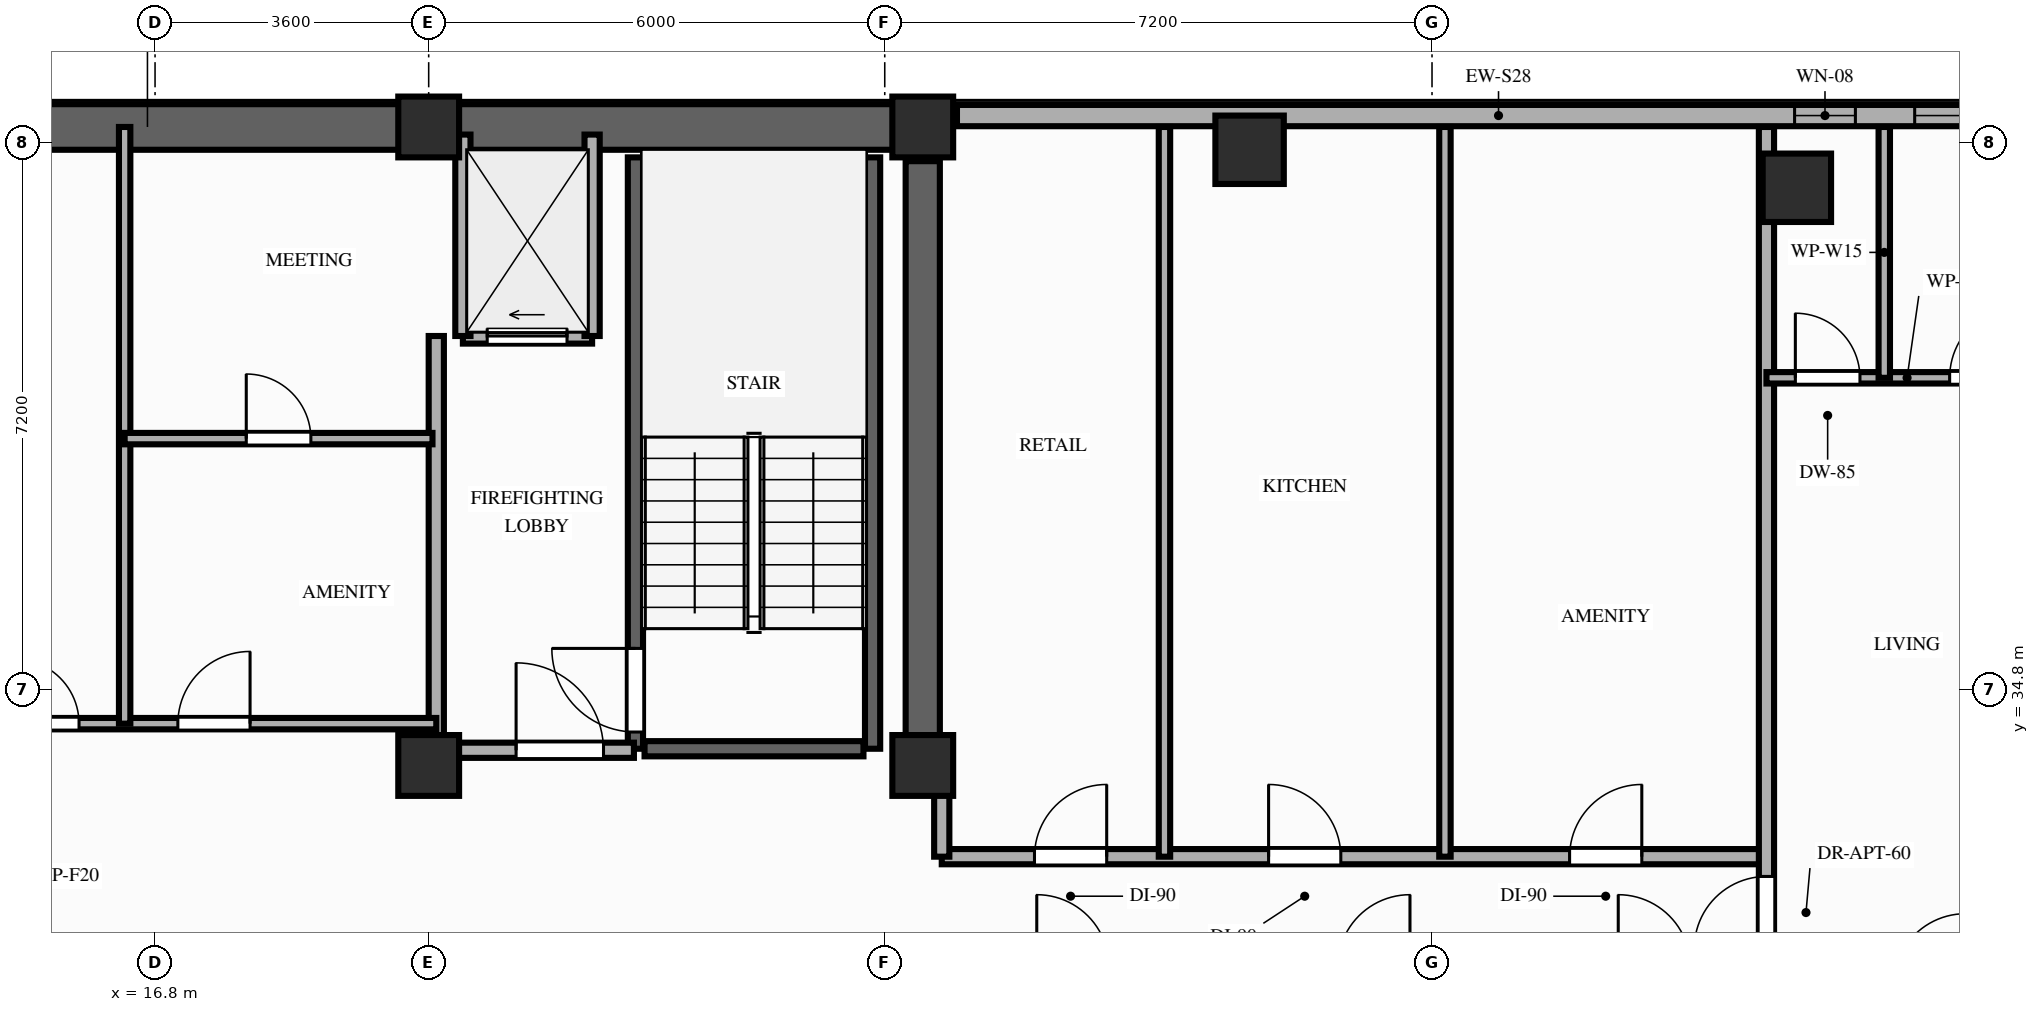
"""IFC4 building model, lengths in metres.
Left out: names, types, materials, properties, quantities, classifications, styles, units other than length and angle.
Written with IfcOpenShell. Run it as: python <this file> out.ifc"""

import sys

from ifc_helpers import new_model, si_unit, direction, frame, frame_2d, origin, origin_2d, place, context, subcontext, project, spatial, rectangle, extrude, element, fill, save


model = new_model("IFC4")
c1 = context("Model", 3, precision=1e-05, world=origin(), true_north=direction((0.0, 1.0)))
c2 = subcontext(c1, "Body", "Model", "MODEL_VIEW")
j1 = project(units=[si_unit("LENGTHUNIT", "METRE"), si_unit("PLANEANGLEUNIT", "RADIAN")], contexts=[c1])
p1 = place(None, origin())
s1 = spatial("IfcSite", under=j1, at=p1, CompositionType="ELEMENT")
p2 = place(p1, origin())
s2 = spatial("IfcBuilding", under=s1, at=p2, CompositionType="ELEMENT")
p3 = place(p2, frame((0.0, 0.0, 192.0)))
s3 = spatial("IfcBuildingStorey", under=s2, at=p3, CompositionType="ELEMENT", Elevation=192.0)
for number, where, z_axis, x_axis in (
    (1, (20.4, 33.8, 0.0), (0.0, 0.0, 1.0), (1.0, 0.0, 0.0)),
    (2, (26.9, 33.8, 0.0), (0.0, 0.0, 1.0), (1.0, 0.0, 0.0)),
    (3, (20.4, 42.2, 0.0), (0.0, 0.0, 1.0), (1.0, 0.0, 0.0)),
    (4, (26.9, 42.2, 0.0), (0.0, 0.0, 1.0), (1.0, 0.0, 0.0)),
):
    element("IfcColumn", number, at=place(p3, frame(where, z_axis=z_axis, x_axis=x_axis)), inside=s3, PredefinedType="COLUMN", context=c2, shape_type="SweptSolid", body=[
        extrude(rectangle(XDim=0.8, YDim=0.8, at=origin_2d()), origin(), (0.0, 0.0, 1.0), 3.2),
    ])
for number, where, z_axis, x_axis in (
    (5, (31.2, 41.9, 0.0), (0.0, 0.0, 1.0), (1.0, 0.0, 0.0)),
    (6, (38.4, 41.4, 0.0), (0.0, 0.0, 1.0), (1.0, 0.0, 0.0)),
):
    element("IfcColumn", number, at=place(p3, frame(where, z_axis=z_axis, x_axis=x_axis)), inside=s3, PredefinedType="COLUMN", context=c2, shape_type="SweptSolid", body=[
        extrude(rectangle(XDim=0.9, YDim=0.9, at=origin_2d()), origin(), (0.0, 0.0, 1.0), 3.2),
    ])
p4 = place(p3, frame((41.6, 42.35, 0.0), z_axis=(0.0, 0.0, 1.0), x_axis=(-1.0, 0.0, 0.0)))
e7 = element("IfcWall", 7, at=p4, inside=s3, PredefinedType="STANDARD", context=c2, shape_type="SweptSolid", body=[
    extrude(rectangle(XDim=14.25, YDim=0.28, at=frame_2d((7.125, 0.0))), origin(), (0.0, 0.0, 1.0), 2.51),
])
p5 = place(p4, frame((2.43, 0.0, 0.85)))
e8 = element("IfcOpeningElement", 8, at=p5, cuts=e7, PredefinedType="OPENING", context=c2, shape_type="SweptSolid", body=[
    extrude(rectangle(XDim=0.8, YDim=1.41, at=frame_2d((0.4, 0.705))), frame((0.0, 0.15, 0.0), z_axis=(0.0, -1.0, 0.0), x_axis=(1.0, 0.0, 0.0)), (0.0, 0.0, 1.0), 0.3),
])
p6 = place(p4, frame((0.55, 0.0, 0.85)))
e9 = element("IfcOpeningElement", 9, at=p6, cuts=e7, PredefinedType="OPENING", context=c2, shape_type="SweptSolid", body=[
    extrude(rectangle(XDim=1.1, YDim=1.41, at=frame_2d((0.55, 0.705))), frame((0.0, 0.15, 0.0), z_axis=(0.0, -1.0, 0.0), x_axis=(1.0, 0.0, 0.0)), (0.0, 0.0, 1.0), 0.3),
])
p7 = place(p3, frame((6.45, 42.2, 0.0), z_axis=(0.0, 0.0, 1.0), x_axis=(1.0, 0.0, 0.0)))
e10 = element("IfcWall", 10, at=p7, inside=s3, PredefinedType="SHEAR", context=c2, shape_type="SweptSolid", body=[
    extrude(rectangle(XDim=20.45, YDim=0.6, at=frame_2d((10.225, 0.0))), origin(), (0.0, 0.0, 1.0), 3.02),
])
p8 = place(p3, frame((26.9, 33.8, 0.0), z_axis=(0.0, 0.0, 1.0), x_axis=(0.0, 1.0, 0.0)))
e11 = element("IfcWall", 11, at=p8, inside=s3, PredefinedType="SHEAR", context=c2, shape_type="SweptSolid", body=[
    extrude(rectangle(XDim=7.95, YDim=0.45, at=frame_2d((3.975, 0.0))), origin(), (0.0, 0.0, 1.0), 3.02),
])
p9 = place(p3, frame((23.12, 34.02, 0.0), z_axis=(0.0, 0.0, 1.0), x_axis=(0.0, 1.0, 0.0)))
e12 = element("IfcWall", 12, at=p9, inside=s3, PredefinedType="SHEAR", context=c2, shape_type="SweptSolid", body=[
    extrude(rectangle(XDim=7.78, YDim=0.2, at=frame_2d((3.89, 0.0))), origin(), (0.0, 0.0, 1.0), 3.02),
])
p10 = place(p9, frame((0.22, 0.0, 0.0)))
e13 = element("IfcOpeningElement", 13, at=p10, cuts=e12, PredefinedType="OPENING", context=c2, shape_type="SweptSolid", body=[
    extrude(rectangle(XDim=1.1, YDim=2.15, at=frame_2d((0.55, 1.075))), frame((0.0, 0.11, 0.0), z_axis=(0.0, -1.0, 0.0), x_axis=(1.0, 0.0, 0.0)), (0.0, 0.0, 1.0), 0.22),
])
p11 = place(p3, frame((26.24, 34.02, 0.0), z_axis=(0.0, 0.0, 1.0), x_axis=(0.0, 1.0, 0.0)))
e14 = element("IfcWall", 14, at=p11, inside=s3, PredefinedType="SHEAR", context=c2, shape_type="SweptSolid", body=[
    extrude(rectangle(XDim=7.78, YDim=0.2, at=frame_2d((3.89, 0.0))), origin(), (0.0, 0.0, 1.0), 3.02),
])
p12 = place(p3, frame((23.24, 34.02, 0.0), z_axis=(0.0, 0.0, 1.0), x_axis=(1.0, 0.0, 0.0)))
e15 = element("IfcWall", 15, at=p12, inside=s3, PredefinedType="SHEAR", context=c2, shape_type="SweptSolid", body=[
    extrude(rectangle(XDim=2.88, YDim=0.2, at=frame_2d((1.44, 0.0))), origin(), (0.0, 0.0, 1.0), 3.02),
])
p13 = place(p3, frame((20.85, 39.45, 0.0), z_axis=(0.0, 0.0, 1.0), x_axis=(1.0, 0.0, 0.0)))
e16 = element("IfcWall", 16, at=p13, inside=s3, PredefinedType="MOVABLE", context=c2, shape_type="SweptSolid", body=[
    extrude(rectangle(XDim=1.7, YDim=0.2, at=frame_2d((0.85, 0.0))), origin(), (0.0, 0.0, 1.0), 3.02),
])
p14 = place(p13, frame((0.32, 0.0, 0.0)))
e17 = element("IfcOpeningElement", 17, at=p14, cuts=e16, PredefinedType="OPENING", context=c2, shape_type="SweptSolid", body=[
    extrude(rectangle(XDim=1.05, YDim=2.15, at=frame_2d((0.525, 1.075))), frame((0.0, 0.11, 0.0), z_axis=(0.0, -1.0, 0.0), x_axis=(1.0, 0.0, 0.0)), (0.0, 0.0, 1.0), 0.22),
])
for number, where, z_axis, x_axis in (
    (18, (20.85, 39.45, 0.0), (0.0, 0.0, 1.0), (0.0, 1.0, 0.0)),
    (19, (22.55, 39.45, 0.0), (0.0, 0.0, 1.0), (0.0, 1.0, 0.0)),
):
    element("IfcWall", number, at=place(p3, frame(where, z_axis=z_axis, x_axis=x_axis)), inside=s3, PredefinedType="MOVABLE", context=c2, shape_type="SweptSolid", body=[
        extrude(rectangle(XDim=2.65, YDim=0.2, at=frame_2d((1.325, 0.0))), origin(), (0.0, 0.0, 1.0), 2.51),
    ])
p15 = place(p3, frame((20.5, 34.0, 0.0), z_axis=(0.0, 0.0, 1.0), x_axis=(0.0, 1.0, 0.0)))
e20 = element("IfcWall", 20, at=p15, inside=s3, PredefinedType="PARTITIONING", context=c2, shape_type="SweptSolid", body=[
    extrude(rectangle(XDim=5.45, YDim=0.2, at=frame_2d((2.725, 0.0))), origin(), (0.0, 0.0, 1.0), 2.51),
])
p16 = place(p3, frame((20.5, 34.0, 0.0), z_axis=(0.0, 0.0, 1.0), x_axis=(1.0, 0.0, 0.0)))
e21 = element("IfcWall", 21, at=p16, inside=s3, PredefinedType="PARTITIONING", context=c2, shape_type="SweptSolid", body=[
    extrude(rectangle(XDim=2.6, YDim=0.2, at=frame_2d((1.3, 0.0))), origin(), (0.0, 0.0, 1.0), 2.51),
])
p17 = place(p16, frame((1.05, 0.0, 0.0)))
e22 = element("IfcOpeningElement", 22, at=p17, cuts=e21, PredefinedType="OPENING", context=c2, shape_type="SweptSolid", body=[
    extrude(rectangle(XDim=1.15, YDim=2.15, at=frame_2d((0.575, 1.075))), frame((0.0, 0.11, 0.0), z_axis=(0.0, -1.0, 0.0), x_axis=(1.0, 0.0, 0.0)), (0.0, 0.0, 1.0), 0.22),
])
p18 = place(p3, frame((12.9, 34.35, 0.0), z_axis=(0.0, 0.0, 1.0), x_axis=(1.0, 0.0, 0.0)))
e23 = element("IfcWall", 23, at=p18, inside=s3, PredefinedType="PARTITIONING", context=c2, shape_type="SweptSolid", body=[
    extrude(rectangle(XDim=7.6, YDim=0.15, at=frame_2d((3.8, 0.0))), origin(), (0.0, 0.0, 1.0), 3.02),
])
p19 = place(p18, frame((2.05, 0.0, 0.0)))
e24 = element("IfcOpeningElement", 24, at=p19, cuts=e23, PredefinedType="OPENING", context=c2, shape_type="SweptSolid", body=[
    extrude(rectangle(XDim=0.85, YDim=2.05, at=frame_2d((0.425, 1.025))), frame((0.0, 0.085, 0.0), z_axis=(0.0, -1.0, 0.0), x_axis=(1.0, 0.0, 0.0)), (0.0, 0.0, 1.0), 0.17),
])
p20 = place(p18, frame((4.2, 0.0, 0.0)))
e25 = element("IfcOpeningElement", 25, at=p20, cuts=e23, PredefinedType="OPENING", context=c2, shape_type="SweptSolid", body=[
    extrude(rectangle(XDim=0.95, YDim=2.15, at=frame_2d((0.475, 1.075))), frame((0.0, 0.085, 0.0), z_axis=(0.0, -1.0, 0.0), x_axis=(1.0, 0.0, 0.0)), (0.0, 0.0, 1.0), 0.17),
])
p21 = place(p3, frame((16.4, 34.35, 0.0), z_axis=(0.0, 0.0, 1.0), x_axis=(0.0, 1.0, 0.0)))
e26 = element("IfcWall", 26, at=p21, inside=s3, PredefinedType="PARTITIONING", context=c2, shape_type="SweptSolid", body=[
    extrude(rectangle(XDim=7.85, YDim=0.15, at=frame_2d((3.925, 0.0))), origin(), (0.0, 0.0, 1.0), 2.51),
])
p22 = place(p3, frame((16.4, 38.1, 0.0), z_axis=(0.0, 0.0, 1.0), x_axis=(1.0, 0.0, 0.0)))
e27 = element("IfcWall", 27, at=p22, inside=s3, PredefinedType="PARTITIONING", context=c2, shape_type="SweptSolid", body=[
    extrude(rectangle(XDim=4.05, YDim=0.15, at=frame_2d((2.025, 0.0))), origin(), (0.0, 0.0, 1.0), 3.02),
])
p23 = place(p22, frame((1.6, 0.0, 0.0)))
e28 = element("IfcOpeningElement", 28, at=p23, cuts=e27, PredefinedType="OPENING", context=c2, shape_type="SweptSolid", body=[
    extrude(rectangle(XDim=0.85, YDim=2.05, at=frame_2d((0.425, 1.025))), frame((0.0, 0.085, 0.0), z_axis=(0.0, -1.0, 0.0), x_axis=(1.0, 0.0, 0.0)), (0.0, 0.0, 1.0), 0.17),
])
p24 = place(p3, frame((27.15, 32.6, 0.0), z_axis=(0.0, 0.0, 1.0), x_axis=(1.0, 0.0, 0.0)))
e29 = element("IfcWall", 29, at=p24, inside=s3, PredefinedType="PARTITIONING", context=c2, shape_type="SweptSolid", body=[
    extrude(rectangle(XDim=10.85, YDim=0.2, at=frame_2d((5.425, 0.0))), origin(), (0.0, 0.0, 1.0), 2.51),
])
p25 = place(p24, frame((1.22, 0.0, 0.0)))
e30 = element("IfcOpeningElement", 30, at=p25, cuts=e29, PredefinedType="OPENING", context=c2, shape_type="SweptSolid", body=[
    extrude(rectangle(XDim=0.95, YDim=2.15, at=frame_2d((0.475, 1.075))), frame((0.0, 0.11, 0.0), z_axis=(0.0, -1.0, 0.0), x_axis=(1.0, 0.0, 0.0)), (0.0, 0.0, 1.0), 0.22),
])
p26 = place(p24, frame((4.3, 0.0, 0.0)))
e31 = element("IfcOpeningElement", 31, at=p26, cuts=e29, PredefinedType="OPENING", context=c2, shape_type="SweptSolid", body=[
    extrude(rectangle(XDim=0.95, YDim=2.15, at=frame_2d((0.475, 1.075))), frame((0.0, 0.11, 0.0), z_axis=(0.0, -1.0, 0.0), x_axis=(1.0, 0.0, 0.0)), (0.0, 0.0, 1.0), 0.22),
])
p27 = place(p24, frame((8.26, 0.0, 0.0)))
e32 = element("IfcOpeningElement", 32, at=p27, cuts=e29, PredefinedType="OPENING", context=c2, shape_type="SweptSolid", body=[
    extrude(rectangle(XDim=0.95, YDim=2.15, at=frame_2d((0.475, 1.075))), frame((0.0, 0.11, 0.0), z_axis=(0.0, -1.0, 0.0), x_axis=(1.0, 0.0, 0.0)), (0.0, 0.0, 1.0), 0.22),
])
p28 = place(p3, frame((27.15, 32.6, 0.0), z_axis=(0.0, 0.0, 1.0), x_axis=(0.0, 1.0, 0.0)))
e33 = element("IfcWall", 33, at=p28, inside=s3, PredefinedType="PARTITIONING", context=c2, shape_type="SweptSolid", body=[
    extrude(rectangle(XDim=1.08, YDim=0.2, at=frame_2d((0.54, 0.0))), origin(), (0.0, 0.0, 1.0), 2.51),
])
p29 = place(p3, frame((38.0, 26.75, 0.0), z_axis=(0.0, 0.0, 1.0), x_axis=(0.0, 1.0, 0.0)))
e34 = element("IfcWall", 34, at=p29, inside=s3, PredefinedType="PARTITIONING", context=c2, shape_type="SweptSolid", body=[
    extrude(rectangle(XDim=15.45, YDim=0.2, at=frame_2d((7.725, 0.0))), origin(), (0.0, 0.0, 1.0), 2.51),
])
p30 = place(p29, frame((4.64, 0.0, 0.0)))
e35 = element("IfcOpeningElement", 35, at=p30, cuts=e34, PredefinedType="OPENING", context=c2, shape_type="SweptSolid", body=[
    extrude(rectangle(XDim=0.95, YDim=2.15, at=frame_2d((0.475, 1.075))), frame((0.0, 0.11, 0.0), z_axis=(0.0, -1.0, 0.0), x_axis=(1.0, 0.0, 0.0)), (0.0, 0.0, 1.0), 0.22),
])
p31 = place(p3, frame((38.0, 38.9, 0.0), z_axis=(0.0, 0.0, 1.0), x_axis=(1.0, 0.0, 0.0)))
e36 = element("IfcWall", 36, at=p31, inside=s3, PredefinedType="PARTITIONING", context=c2, shape_type="SweptSolid", body=[
    extrude(rectangle(XDim=3.7, YDim=0.15, at=frame_2d((1.85, 0.0))), origin(), (0.0, 0.0, 1.0), 2.51),
])
p32 = place(p31, frame((0.38, 0.0, 0.0)))
e37 = element("IfcOpeningElement", 37, at=p32, cuts=e36, PredefinedType="OPENING", context=c2, shape_type="SweptSolid", body=[
    extrude(rectangle(XDim=0.85, YDim=2.1, at=frame_2d((0.425, 1.05))), frame((0.0, 0.085, 0.0), z_axis=(0.0, -1.0, 0.0), x_axis=(1.0, 0.0, 0.0)), (0.0, 0.0, 1.0), 0.17),
])
p33 = place(p31, frame((2.41, 0.0, 0.0)))
e38 = element("IfcOpeningElement", 38, at=p33, cuts=e36, PredefinedType="OPENING", context=c2, shape_type="SweptSolid", body=[
    extrude(rectangle(XDim=0.95, YDim=2.15, at=frame_2d((0.475, 1.075))), frame((0.0, 0.085, 0.0), z_axis=(0.0, -1.0, 0.0), x_axis=(1.0, 0.0, 0.0)), (0.0, 0.0, 1.0), 0.17),
])
p34 = place(p3, frame((39.55, 38.9, 0.0), z_axis=(0.0, 0.0, 1.0), x_axis=(0.0, 1.0, 0.0)))
e39 = element("IfcWall", 39, at=p34, inside=s3, PredefinedType="PARTITIONING", context=c2, shape_type="SweptSolid", body=[
    extrude(rectangle(XDim=3.3, YDim=0.15, at=frame_2d((1.65, 0.0))), origin(), (0.0, 0.0, 1.0), 2.51),
])
for number, where, z_axis, x_axis in (
    (40, (30.08, 32.6, 0.0), (0.0, 0.0, 1.0), (0.0, 1.0, 0.0)),
    (41, (33.77, 32.6, 0.0), (0.0, 0.0, 1.0), (0.0, 1.0, 0.0)),
):
    element("IfcWall", number, at=place(p3, frame(where, z_axis=z_axis, x_axis=x_axis)), inside=s3, PredefinedType="PARTITIONING", context=c2, shape_type="SweptSolid", body=[
        extrude(rectangle(XDim=9.6, YDim=0.15, at=frame_2d((4.8, 0.0))), origin(), (0.0, 0.0, 1.0), 2.51),
    ])
p35 = place(p5, origin())
e42 = element("IfcWindow", 42, at=p35, inside=s3, PartitioningType="SINGLE_PANEL", PredefinedType="WINDOW", context=c2, shape_type="SweptSolid", body=[
    extrude(rectangle(XDim=0.8, YDim=1.41, at=frame_2d((0.4, 0.705))), frame((0.0, 0.03, 0.0), z_axis=(0.0, -1.0, 0.0), x_axis=(1.0, 0.0, 0.0)), (0.0, 0.0, 1.0), 0.06),
])
fill(e8, e42)
p36 = place(p6, origin())
e43 = element("IfcWindow", 43, at=p36, inside=s3, PartitioningType="SINGLE_PANEL", PredefinedType="WINDOW", context=c2, shape_type="SweptSolid", body=[
    extrude(rectangle(XDim=1.1, YDim=1.41, at=frame_2d((0.55, 0.705))), frame((0.0, 0.03, 0.0), z_axis=(0.0, -1.0, 0.0), x_axis=(1.0, 0.0, 0.0)), (0.0, 0.0, 1.0), 0.06),
])
fill(e9, e43)
p37 = place(p10, origin())
e44 = element("IfcDoor", 44, at=p37, inside=s3, OperationType="SINGLE_SWING_RIGHT", PredefinedType="DOOR", context=c2, shape_type="SweptSolid", body=[
    extrude(rectangle(XDim=1.1, YDim=2.15, at=frame_2d((0.55, 1.075))), frame((0.0, 0.025, 0.0), z_axis=(0.0, -1.0, 0.0), x_axis=(1.0, 0.0, 0.0)), (0.0, 0.0, 1.0), 0.05),
])
fill(e13, e44)
p38 = place(p14, origin())
e45 = element("IfcDoor", 45, at=p38, inside=s3, OperationType="SLIDING_TO_LEFT", PredefinedType="DOOR", context=c2, shape_type="SweptSolid", body=[
    extrude(rectangle(XDim=1.05, YDim=2.15, at=frame_2d((0.525, 1.075))), frame((0.0, 0.025, 0.0), z_axis=(0.0, -1.0, 0.0), x_axis=(1.0, 0.0, 0.0)), (0.0, 0.0, 1.0), 0.05),
])
fill(e17, e45)
p39 = place(p17, origin())
e46 = element("IfcDoor", 46, at=p39, inside=s3, OperationType="SINGLE_SWING_LEFT", PredefinedType="DOOR", context=c2, shape_type="SweptSolid", body=[
    extrude(rectangle(XDim=1.15, YDim=2.15, at=frame_2d((0.575, 1.075))), frame((0.0, 0.025, 0.0), z_axis=(0.0, -1.0, 0.0), x_axis=(1.0, 0.0, 0.0)), (0.0, 0.0, 1.0), 0.05),
])
fill(e22, e46)
p40 = place(p19, origin())
e47 = element("IfcDoor", 47, at=p40, inside=s3, OperationType="SINGLE_SWING_LEFT", PredefinedType="DOOR", context=c2, shape_type="SweptSolid", body=[
    extrude(rectangle(XDim=0.85, YDim=2.05, at=frame_2d((0.425, 1.025))), frame((0.0, 0.025, 0.0), z_axis=(0.0, -1.0, 0.0), x_axis=(1.0, 0.0, 0.0)), (0.0, 0.0, 1.0), 0.05),
])
fill(e24, e47)
p41 = place(p20, origin())
e48 = element("IfcDoor", 48, at=p41, inside=s3, OperationType="SINGLE_SWING_RIGHT", PredefinedType="DOOR", context=c2, shape_type="SweptSolid", body=[
    extrude(rectangle(XDim=0.95, YDim=2.15, at=frame_2d((0.475, 1.075))), frame((0.0, 0.025, 0.0), z_axis=(0.0, -1.0, 0.0), x_axis=(1.0, 0.0, 0.0)), (0.0, 0.0, 1.0), 0.05),
])
fill(e25, e48)
p42 = place(p23, origin())
e49 = element("IfcDoor", 49, at=p42, inside=s3, OperationType="SINGLE_SWING_LEFT", PredefinedType="DOOR", context=c2, shape_type="SweptSolid", body=[
    extrude(rectangle(XDim=0.85, YDim=2.05, at=frame_2d((0.425, 1.025))), frame((0.0, 0.025, 0.0), z_axis=(0.0, -1.0, 0.0), x_axis=(1.0, 0.0, 0.0)), (0.0, 0.0, 1.0), 0.05),
])
fill(e28, e49)
p43 = place(p30, origin())
e50 = element("IfcDoor", 50, at=p43, inside=s3, OperationType="SINGLE_SWING_LEFT", PredefinedType="DOOR", context=c2, shape_type="SweptSolid", body=[
    extrude(rectangle(XDim=0.95, YDim=2.15, at=frame_2d((0.475, 1.075))), frame((0.0, 0.025, 0.0), z_axis=(0.0, -1.0, 0.0), x_axis=(1.0, 0.0, 0.0)), (0.0, 0.0, 1.0), 0.05),
])
fill(e35, e50)
p44 = place(p32, origin())
e51 = element("IfcDoor", 51, at=p44, inside=s3, OperationType="SINGLE_SWING_LEFT", PredefinedType="DOOR", context=c2, shape_type="SweptSolid", body=[
    extrude(rectangle(XDim=0.85, YDim=2.1, at=frame_2d((0.425, 1.05))), frame((0.0, 0.025, 0.0), z_axis=(0.0, -1.0, 0.0), x_axis=(1.0, 0.0, 0.0)), (0.0, 0.0, 1.0), 0.05),
])
fill(e37, e51)
p45 = place(p33, origin())
e52 = element("IfcDoor", 52, at=p45, inside=s3, OperationType="SINGLE_SWING_RIGHT", PredefinedType="DOOR", context=c2, shape_type="SweptSolid", body=[
    extrude(rectangle(XDim=0.95, YDim=2.15, at=frame_2d((0.475, 1.075))), frame((0.0, 0.025, 0.0), z_axis=(0.0, -1.0, 0.0), x_axis=(1.0, 0.0, 0.0)), (0.0, 0.0, 1.0), 0.05),
])
fill(e38, e52)
p46 = place(p25, origin())
e53 = element("IfcDoor", 53, at=p46, inside=s3, OperationType="SINGLE_SWING_RIGHT", PredefinedType="DOOR", context=c2, shape_type="SweptSolid", body=[
    extrude(rectangle(XDim=0.95, YDim=2.15, at=frame_2d((0.475, 1.075))), frame((0.0, 0.025, 0.0), z_axis=(0.0, -1.0, 0.0), x_axis=(1.0, 0.0, 0.0)), (0.0, 0.0, 1.0), 0.05),
])
fill(e30, e53)
p47 = place(p26, origin())
e54 = element("IfcDoor", 54, at=p47, inside=s3, OperationType="SINGLE_SWING_LEFT", PredefinedType="DOOR", context=c2, shape_type="SweptSolid", body=[
    extrude(rectangle(XDim=0.95, YDim=2.15, at=frame_2d((0.475, 1.075))), frame((0.0, 0.025, 0.0), z_axis=(0.0, -1.0, 0.0), x_axis=(1.0, 0.0, 0.0)), (0.0, 0.0, 1.0), 0.05),
])
fill(e31, e54)
p48 = place(p27, origin())
e55 = element("IfcDoor", 55, at=p48, inside=s3, OperationType="SINGLE_SWING_RIGHT", PredefinedType="DOOR", context=c2, shape_type="SweptSolid", body=[
    extrude(rectangle(XDim=0.95, YDim=2.15, at=frame_2d((0.475, 1.075))), frame((0.0, 0.025, 0.0), z_axis=(0.0, -1.0, 0.0), x_axis=(1.0, 0.0, 0.0)), (0.0, 0.0, 1.0), 0.05),
])
fill(e32, e55)
save(model, sys.argv[1])
